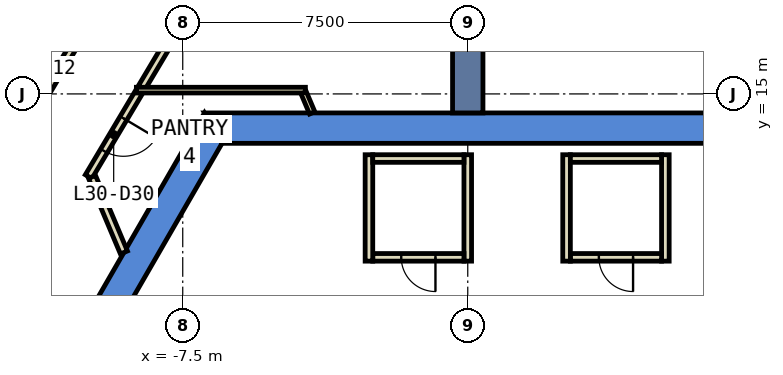
"""IFC4 building model, lengths in metres.
Left out: names, types, materials, properties, quantities, classifications, styles, units other than length and angle.
Written with IfcOpenShell. Run it as: python <this file> out.ifc"""

import sys

from ifc_helpers import new_model, si_unit, direction, frame, frame_2d, origin, place, context, subcontext, project, spatial, polyline, rectangle, outline, extrude, element, fill, save


model = new_model("IFC4")
c1 = context("Model", 3, precision=1e-05, world=origin(), true_north=direction((0.0, 1.0)))
c2 = subcontext(c1, "Body", "Model", "MODEL_VIEW")
j1 = project(units=[si_unit("LENGTHUNIT", "METRE"), si_unit("PLANEANGLEUNIT", "RADIAN")], contexts=[c1])
p1 = place(None, origin())
s1 = spatial("IfcSite", under=j1, at=p1, CompositionType="ELEMENT")
p2 = place(p1, origin())
s2 = spatial("IfcBuilding", under=s1, at=p2, CompositionType="ELEMENT")
p3 = place(p2, frame((0.0, 0.0, 138.2)))
s3 = spatial("IfcBuildingStorey", under=s2, at=p3, CompositionType="ELEMENT", Elevation=138.2)
p4 = place(p3, frame((0.0, 0.0, -0.6)))
e1 = element("IfcWall", 1, at=p4, inside=s3, PredefinedType="SHEAR", context=c2, shape_type="SweptSolid", body=[
    extrude(outline(polyline([(6.928, 14.5), (-6.928, 14.5), (-6.466, 13.7), (6.466, 13.7), (6.928, 14.5)])), origin(), (0.0, 0.0, 1.0), 4.4),
])
p5 = place(p3, frame((0.0, 0.0, -0.6)))
e2 = element("IfcWall", 2, at=p5, inside=s3, PredefinedType="SHEAR", context=c2, shape_type="SweptSolid", body=[
    extrude(outline(polyline([(-12.267, 5.252), (-11.575, 4.852), (-6.466, 13.7), (-6.928, 14.5), (-12.267, 5.252)])), origin(), (0.0, 0.0, 1.0), 4.4),
])
p6 = place(p3, frame((0.0, 14.5, -0.6), z_axis=(0.0, 0.0, 1.0), x_axis=(0.0, 1.0, 0.0)))
e3 = element("IfcWall", 3, at=p6, inside=s3, PredefinedType="SHEAR", context=c2, shape_type="SweptSolid", body=[
    extrude(rectangle(XDim=9.0, YDim=0.8, at=frame_2d((4.5, 0.0))), origin(), (0.0, 0.0, 1.0), 4.4),
])
p7 = place(p3, frame((-8.658, 15.036, 0.0), z_axis=(0.0, 0.0, 1.0), x_axis=(-0.511860217954, -0.859068750029, 0.0)))
e4 = element("IfcWall", 4, at=p7, inside=s3, PredefinedType="PARTITIONING", context=c2, shape_type="SweptSolid", body=[
    extrude(rectangle(XDim=2.577, YDim=0.2, at=frame_2d((1.289, 0.0))), origin(), (0.0, 0.0, 1.0), 3.8),
])
p8 = place(p7, frame((0.788, 0.0, 0.0)))
e5 = element("IfcOpeningElement", 5, at=p8, cuts=e4, PredefinedType="OPENING", context=c2, shape_type="SweptSolid", body=[
    extrude(rectangle(XDim=1.0, YDim=2.1, at=frame_2d((0.5, 1.05))), frame((0.0, 0.11, 0.0), z_axis=(0.0, -1.0, 0.0), x_axis=(1.0, 0.0, 0.0)), (0.0, 0.0, 1.0), 0.22),
])
p9 = place(p3, frame((-9.887, 12.816, 0.0), z_axis=(0.0, 0.0, 1.0), x_axis=(0.388765037942, -0.921336933632, 0.0)))
e6 = element("IfcWall", 6, at=p9, inside=s3, PredefinedType="PARTITIONING", context=c2, shape_type="SweptSolid", body=[
    extrude(rectangle(XDim=2.158, YDim=0.2, at=frame_2d((1.079, 0.0))), origin(), (0.0, 0.0, 1.0), 3.8),
])
p10 = place(p3, frame((-7.789, 16.494, 0.0), z_axis=(0.0, 0.0, 1.0), x_axis=(-0.511686277462, -0.859172365394, 0.0)))
e7 = element("IfcWall", 7, at=p10, inside=s3, PredefinedType="PARTITIONING", context=c2, shape_type="SweptSolid", body=[
    extrude(rectangle(XDim=1.548, YDim=0.2, at=frame_2d((0.774, 0.0))), origin(), (0.0, 0.0, 1.0), 3.8),
])
p11 = place(p3, frame((-13.184, 11.542, 0.0), z_axis=(0.0, 0.0, 1.0), x_axis=(0.511847713534, 0.859076200433, 0.0)))
e8 = element("IfcWall", 8, at=p11, inside=s3, PredefinedType="PARTITIONING", context=c2, shape_type="SweptSolid", body=[
    extrude(rectangle(XDim=7.03, YDim=0.2, at=frame_2d((3.515, 0.0))), origin(), (0.0, 0.0, 1.0), 3.8),
])
p12 = place(p11, frame((3.015, 0.0, 0.0)))
e9 = element("IfcOpeningElement", 9, at=p12, cuts=e8, PredefinedType="OPENING", context=c2, shape_type="SweptSolid", body=[
    extrude(rectangle(XDim=1.0, YDim=2.1, at=frame_2d((0.5, 1.05))), frame((0.0, 0.11, 0.0), z_axis=(0.0, -1.0, 0.0), x_axis=(1.0, 0.0, 0.0)), (0.0, 0.0, 1.0), 0.22),
])
p13 = place(p3, frame((5.2, 13.4, 0.0), z_axis=(0.0, 0.0, 1.0), x_axis=(0.0, -1.0, 0.0)))
e10 = element("IfcWall", 10, at=p13, inside=s3, PredefinedType="PARTITIONING", context=c2, shape_type="SweptSolid", body=[
    extrude(rectangle(XDim=2.8, YDim=0.2, at=frame_2d((1.4, 0.0))), origin(), (0.0, 0.0, 1.0), 3.8),
])
p14 = place(p3, frame((5.1, 10.7, 0.0), z_axis=(0.0, 0.0, 1.0), x_axis=(-1.0, 0.0, 0.0)))
e11 = element("IfcWall", 11, at=p14, inside=s3, PredefinedType="PARTITIONING", context=c2, shape_type="SweptSolid", body=[
    extrude(rectangle(XDim=2.4, YDim=0.2, at=frame_2d((1.2, 0.0))), origin(), (0.0, 0.0, 1.0), 3.8),
])
p15 = place(p14, frame((0.75, 0.0, 0.0)))
e12 = element("IfcOpeningElement", 12, at=p15, cuts=e11, PredefinedType="OPENING", context=c2, shape_type="SweptSolid", body=[
    extrude(rectangle(XDim=0.9, YDim=2.1, at=frame_2d((0.45, 1.05))), frame((0.0, 0.11, 0.0), z_axis=(0.0, -1.0, 0.0), x_axis=(1.0, 0.0, 0.0)), (0.0, 0.0, 1.0), 0.22),
])
p16 = place(p3, frame((2.6, 10.6, 0.0), z_axis=(0.0, 0.0, 1.0), x_axis=(0.0, 1.0, 0.0)))
e13 = element("IfcWall", 13, at=p16, inside=s3, PredefinedType="PARTITIONING", context=c2, shape_type="SweptSolid", body=[
    extrude(rectangle(XDim=2.8, YDim=0.2, at=frame_2d((1.4, 0.0))), origin(), (0.0, 0.0, 1.0), 3.8),
])
p17 = place(p3, frame((2.7, 13.3, 0.0), z_axis=(0.0, 0.0, 1.0), x_axis=(1.0, 0.0, 0.0)))
e14 = element("IfcWall", 14, at=p17, inside=s3, PredefinedType="PARTITIONING", context=c2, shape_type="SweptSolid", body=[
    extrude(rectangle(XDim=2.4, YDim=0.2, at=frame_2d((1.2, 0.0))), origin(), (0.0, 0.0, 1.0), 3.8),
])
p18 = place(p3, frame((0.0, 13.4, 0.0), z_axis=(0.0, 0.0, 1.0), x_axis=(0.0, -1.0, 0.0)))
e15 = element("IfcWall", 15, at=p18, inside=s3, PredefinedType="PARTITIONING", context=c2, shape_type="SweptSolid", body=[
    extrude(rectangle(XDim=2.8, YDim=0.2, at=frame_2d((1.4, 0.0))), origin(), (0.0, 0.0, 1.0), 3.8),
])
p19 = place(p3, frame((-0.1, 10.7, 0.0), z_axis=(0.0, 0.0, 1.0), x_axis=(-1.0, 0.0, 0.0)))
e16 = element("IfcWall", 16, at=p19, inside=s3, PredefinedType="PARTITIONING", context=c2, shape_type="SweptSolid", body=[
    extrude(rectangle(XDim=2.4, YDim=0.2, at=frame_2d((1.2, 0.0))), origin(), (0.0, 0.0, 1.0), 3.8),
])
p20 = place(p19, frame((0.75, 0.0, 0.0)))
e17 = element("IfcOpeningElement", 17, at=p20, cuts=e16, PredefinedType="OPENING", context=c2, shape_type="SweptSolid", body=[
    extrude(rectangle(XDim=0.9, YDim=2.1, at=frame_2d((0.45, 1.05))), frame((0.0, 0.11, 0.0), z_axis=(0.0, -1.0, 0.0), x_axis=(1.0, 0.0, 0.0)), (0.0, 0.0, 1.0), 0.22),
])
p21 = place(p3, frame((-2.6, 10.6, 0.0), z_axis=(0.0, 0.0, 1.0), x_axis=(0.0, 1.0, 0.0)))
e18 = element("IfcWall", 18, at=p21, inside=s3, PredefinedType="PARTITIONING", context=c2, shape_type="SweptSolid", body=[
    extrude(rectangle(XDim=2.8, YDim=0.2, at=frame_2d((1.4, 0.0))), origin(), (0.0, 0.0, 1.0), 3.8),
])
p22 = place(p3, frame((-2.5, 13.3, 0.0), z_axis=(0.0, 0.0, 1.0), x_axis=(1.0, 0.0, 0.0)))
e19 = element("IfcWall", 19, at=p22, inside=s3, PredefinedType="PARTITIONING", context=c2, shape_type="SweptSolid", body=[
    extrude(rectangle(XDim=2.4, YDim=0.2, at=frame_2d((1.2, 0.0))), origin(), (0.0, 0.0, 1.0), 3.8),
])
p23 = place(p3, frame((-4.272, 15.1, 0.0), z_axis=(0.0, 0.0, 1.0), x_axis=(-1.0, 0.0, 0.0)))
e20 = element("IfcWall", 20, at=p23, inside=s3, PredefinedType="PARTITIONING", context=c2, shape_type="SweptSolid", body=[
    extrude(rectangle(XDim=4.448, YDim=0.15, at=frame_2d((2.224, 0.0))), origin(), (0.0, 0.0, 1.0), 3.8),
])
p24 = place(p3, frame((-4.093, 14.5, 0.0), z_axis=(0.0, 0.0, 1.0), x_axis=(-0.390288929197, 0.92069243059, 0.0)))
e21 = element("IfcWall", 21, at=p24, inside=s3, PredefinedType="PARTITIONING", context=c2, shape_type="SweptSolid", body=[
    extrude(rectangle(XDim=0.577, YDim=0.15, at=frame_2d((0.288, 0.0))), origin(), (0.0, 0.0, 1.0), 3.8),
])
p25 = place(p8, origin())
e22 = element("IfcDoor", 22, at=p25, inside=s3, OperationType="SINGLE_SWING_LEFT", PredefinedType="DOOR", context=c2, shape_type="SweptSolid", body=[
    extrude(rectangle(XDim=1.0, YDim=2.1, at=frame_2d((0.5, 1.05))), frame((0.0, 0.025, 0.0), z_axis=(0.0, -1.0, 0.0), x_axis=(1.0, 0.0, 0.0)), (0.0, 0.0, 1.0), 0.05),
])
fill(e5, e22)
p26 = place(p15, origin())
e23 = element("IfcDoor", 23, at=p26, inside=s3, OperationType="SINGLE_SWING_RIGHT", PredefinedType="DOOR", context=c2, shape_type="SweptSolid", body=[
    extrude(rectangle(XDim=0.9, YDim=2.1, at=frame_2d((0.45, 1.05))), frame((0.0, 0.025, 0.0), z_axis=(0.0, -1.0, 0.0), x_axis=(1.0, 0.0, 0.0)), (0.0, 0.0, 1.0), 0.05),
])
fill(e12, e23)
p27 = place(p20, origin())
e24 = element("IfcDoor", 24, at=p27, inside=s3, OperationType="SINGLE_SWING_RIGHT", PredefinedType="DOOR", context=c2, shape_type="SweptSolid", body=[
    extrude(rectangle(XDim=0.9, YDim=2.1, at=frame_2d((0.45, 1.05))), frame((0.0, 0.025, 0.0), z_axis=(0.0, -1.0, 0.0), x_axis=(1.0, 0.0, 0.0)), (0.0, 0.0, 1.0), 0.05),
])
fill(e17, e24)
save(model, sys.argv[1])
